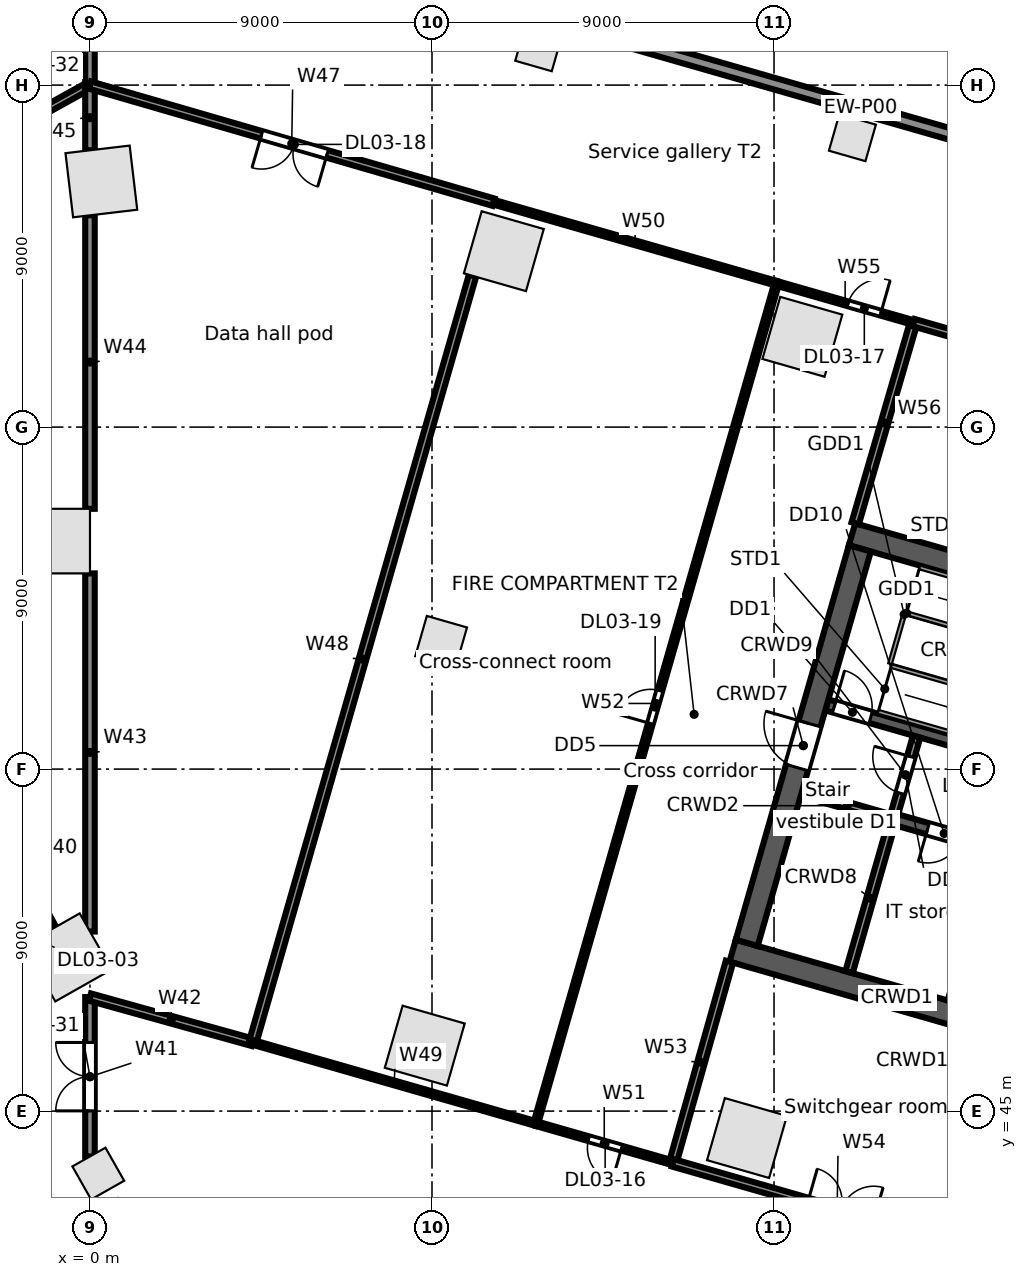
"""IFC4 building model, lengths in metres.
Left out: names, types, materials, properties, quantities, classifications, styles, units other than length and angle.
Written with IfcOpenShell. Run it as: python <this file> out.ifc"""

import sys

from ifc_helpers import new_model, si_unit, direction, frame, frame_2d, origin, origin_2d, place, context, subcontext, project, spatial, rectangle, extrude, element, fill, save


model = new_model("IFC4")
c1 = context("Model", 3, precision=1e-05, world=origin(), true_north=direction((0.0, 1.0)))
c2 = subcontext(c1, "Body", "Model", "MODEL_VIEW")
j1 = project(units=[si_unit("LENGTHUNIT", "METRE"), si_unit("PLANEANGLEUNIT", "RADIAN")], contexts=[c1])
p1 = place(None, origin())
s1 = spatial("IfcSite", under=j1, at=p1, CompositionType="ELEMENT")
p2 = place(p1, origin())
s2 = spatial("IfcBuilding", under=s1, at=p2, CompositionType="ELEMENT")
p3 = place(p2, frame((0.0, 0.0, 16.5)))
s3 = spatial("IfcBuildingStorey", under=s2, at=p3, CompositionType="ELEMENT", Elevation=16.5)
for number, where, z_axis, x_axis in (
    (1, (18.746, 65.376, 0.0), (0.0, 0.0, 1.0), (-0.961, 0.276, 0.0)),
    (2, (10.89, 67.629, 0.0), (0.0, 0.0, 1.0), (-0.961, 0.276, 0.0)),
    (3, (0.3, 69.464, 0.0), (0.0, 0.0, 1.0), (-0.993, -0.118, 0.0)),
    (4, (-0.591, 49.044, 0.0), (0.0, 0.0, 1.0), (0.87, 0.492, 0.0)),
    (5, (8.81, 46.722, 0.0), (0.0, 0.0, 1.0), (0.961, -0.276, 0.0)),
    (6, (17.288, 44.291, 0.0), (0.0, 0.0, 1.0), (0.961, -0.276, 0.0)),
    (7, (-0.85, 60.0, 0.0), (0.0, 0.0, 1.0), (0.0, 1.0, 0.0)),
):
    element("IfcColumn", number, at=place(p3, frame(where, z_axis=z_axis, x_axis=x_axis)), inside=s3, PredefinedType="COLUMN", context=c2, shape_type="SweptSolid", body=[
        extrude(rectangle(XDim=1.7, YDim=1.7, at=origin_2d()), origin(), (0.0, 0.0, 1.0), 5.0),
    ])
for number, where, z_axis, x_axis in (
    (8, (20.062, 70.616, 0.0), (0.0, 0.0, 1.0), (-0.961, 0.276, 0.0)),
    (9, (11.809, 72.983, 0.0), (0.0, 0.0, 1.0), (-0.961, 0.276, 0.0)),
    (10, (0.219, 43.355, 0.0), (0.0, 0.0, 1.0), (0.87, 0.492, 0.0)),
):
    element("IfcColumn", number, at=place(p3, frame(where, z_axis=z_axis, x_axis=x_axis)), inside=s3, PredefinedType="COLUMN", context=c2, shape_type="SweptSolid", body=[
        extrude(rectangle(XDim=1.0, YDim=1.0, at=origin_2d()), origin(), (0.0, 0.0, 1.0), 5.0),
    ])
p4 = place(p3, frame((9.241, 57.35, 0.0), z_axis=(0.0, 0.0, 1.0), x_axis=(0.961261695938, -0.275637355817, 0.0)))
e11 = element("IfcColumn", 11, at=p4, inside=s3, PredefinedType="COLUMN", context=c2, shape_type="SweptSolid", body=[
    extrude(rectangle(XDim=1.1, YDim=1.1, at=origin_2d()), origin(), (0.0, 0.0, 1.0), 5.0),
])
p5 = place(p3, frame((3.747, 76.127, 0.0), z_axis=(0.0, 0.0, 1.0), x_axis=(0.961261546185, -0.275637878067, 0.0)))
e12 = element("IfcWall", 12, at=p5, inside=s3, PredefinedType="STANDARD", context=c2, shape_type="SweptSolid", body=[
    extrude(rectangle(XDim=34.395, YDim=0.3, at=frame_2d((17.197, 0.0))), origin(), (0.0, 0.0, 1.0), 4.65),
])
p6 = place(p3, frame((16.911, 49.221, 0.0), z_axis=(0.0, 0.0, 1.0), x_axis=(0.96126248289, -0.275634611374, 0.0)))
e13 = element("IfcWall", 13, at=p6, inside=s3, PredefinedType="SOLIDWALL", context=c2, shape_type="SweptSolid", body=[
    extrude(rectangle(XDim=9.0, YDim=0.6, at=frame_2d((4.5, 0.0))), origin(), (0.0, 0.0, 1.0), 4.65),
])
p7 = place(p3, frame((18.728, 53.382, 0.0), z_axis=(0.0, 0.0, 1.0), x_axis=(0.961247070632, -0.275688355216, 0.0)))
e14 = element("IfcWall", 14, at=p7, inside=s3, PredefinedType="SOLIDWALL", context=c2, shape_type="SweptSolid", body=[
    extrude(rectangle(XDim=2.5, YDim=0.2, at=frame_2d((1.25, 0.0))), origin(), (0.0, 0.0, 1.0), 4.65),
])
p8 = place(p3, frame((21.131, 52.692, 0.0), z_axis=(0.0, 0.0, 1.0), x_axis=(0.961271492568, -0.275603188616, 0.0)))
e15 = element("IfcWall", 15, at=p8, inside=s3, PredefinedType="SOLIDWALL", context=c2, shape_type="SweptSolid", body=[
    extrude(rectangle(XDim=5.3, YDim=0.3, at=frame_2d((2.65, 0.0))), origin(), (0.0, 0.0, 1.0), 4.65),
])
p9 = place(p8, frame((0.95, 0.0, 0.0)))
e16 = element("IfcOpeningElement", 16, at=p9, cuts=e15, PredefinedType="OPENING", context=c2, shape_type="SweptSolid", body=[
    extrude(rectangle(XDim=0.9, YDim=2.1, at=frame_2d((0.45, 1.05))), frame((0.0, 0.16, 0.0), z_axis=(0.0, -1.0, 0.0), x_axis=(1.0, 0.0, 0.0)), (0.0, 0.0, 1.0), 0.32),
])
p10 = place(p8, frame((3.75, 0.0, 0.0)))
e17 = element("IfcOpeningElement", 17, at=p10, cuts=e15, PredefinedType="OPENING", context=c2, shape_type="SweptSolid", body=[
    extrude(rectangle(XDim=0.9, YDim=2.1, at=frame_2d((0.45, 1.05))), frame((0.0, 0.16, 0.0), z_axis=(0.0, -1.0, 0.0), x_axis=(1.0, 0.0, 0.0)), (0.0, 0.0, 1.0), 0.32),
])
p11 = place(p3, frame((19.389, 55.689, 0.0), z_axis=(0.0, 0.0, 1.0), x_axis=(0.961261397636, -0.275638396117, 0.0)))
e18 = element("IfcWall", 18, at=p11, inside=s3, PredefinedType="SOLIDWALL", context=c2, shape_type="SweptSolid", body=[
    extrude(rectangle(XDim=7.1, YDim=0.3, at=frame_2d((3.55, 0.0))), origin(), (0.0, 0.0, 1.0), 4.65),
])
p12 = place(p11, frame((0.2, 0.0, 0.0)))
e19 = element("IfcOpeningElement", 19, at=p12, cuts=e18, PredefinedType="OPENING", context=c2, shape_type="SweptSolid", body=[
    extrude(rectangle(XDim=1.0, YDim=2.1, at=frame_2d((0.5, 1.05))), frame((0.0, 0.16, 0.0), z_axis=(0.0, -1.0, 0.0), x_axis=(1.0, 0.0, 0.0)), (0.0, 0.0, 1.0), 0.32),
])
p13 = place(p3, frame((20.053, 60.18, 0.0), z_axis=(0.0, 0.0, 1.0), x_axis=(0.96126248289, -0.275634611374, 0.0)))
e20 = element("IfcWall", 20, at=p13, inside=s3, PredefinedType="SOLIDWALL", context=c2, shape_type="SweptSolid", body=[
    extrude(rectangle(XDim=9.0, YDim=0.6, at=frame_2d((4.5, 0.0))), origin(), (0.0, 0.0, 1.0), 4.65),
])
p14 = place(p3, frame((17.282, 49.427, 0.0), z_axis=(0.0, 0.0, 1.0), x_axis=(0.275631631629, 0.961263337304, 0.0)))
e21 = element("IfcWall", 21, at=p14, inside=s3, PredefinedType="SOLIDWALL", context=c2, shape_type="SweptSolid", body=[
    extrude(rectangle(XDim=10.8, YDim=0.6, at=frame_2d((5.4, 0.0))), origin(), (0.0, 0.0, 1.0), 4.65),
])
p15 = place(p14, frame((4.8, 0.0, 0.0)))
e22 = element("IfcOpeningElement", 22, at=p15, cuts=e21, PredefinedType="OPENING", context=c2, shape_type="SweptSolid", body=[
    extrude(rectangle(XDim=1.2, YDim=2.1, at=frame_2d((0.6, 1.05))), frame((0.0, 0.31, 0.0), z_axis=(0.0, -1.0, 0.0), x_axis=(1.0, 0.0, 0.0)), (0.0, 0.0, 1.0), 0.62),
])
p16 = place(p3, frame((19.973, 48.655, 0.0), z_axis=(0.0, 0.0, 1.0), x_axis=(0.275668441653, 0.961252781674, 0.0)))
e23 = element("IfcWall", 23, at=p16, inside=s3, PredefinedType="SOLIDWALL", context=c2, shape_type="SweptSolid", body=[
    extrude(rectangle(XDim=4.05, YDim=0.2, at=frame_2d((2.025, 0.0))), origin(), (0.0, 0.0, 1.0), 4.65),
])
p17 = place(p3, frame((21.172, 52.837, 0.0), z_axis=(0.0, 0.0, 1.0), x_axis=(0.275657676022, 0.961255868981, 0.0)))
e24 = element("IfcWall", 24, at=p17, inside=s3, PredefinedType="PARTITIONING", context=c2, shape_type="SweptSolid", body=[
    extrude(rectangle(XDim=2.1, YDim=0.2, at=frame_2d((1.05, 0.0))), origin(), (0.0, 0.0, 1.0), 4.65),
])
p18 = place(p17, frame((0.55, 0.0, 0.0)))
e25 = element("IfcOpeningElement", 25, at=p18, cuts=e24, PredefinedType="OPENING", context=c2, shape_type="SweptSolid", body=[
    extrude(rectangle(XDim=1.0, YDim=2.1, at=frame_2d((0.5, 1.05))), frame((0.0, 0.11, 0.0), z_axis=(0.0, -1.0, 0.0), x_axis=(1.0, 0.0, 0.0)), (0.0, 0.0, 1.0), 0.22),
])
p19 = place(p3, frame((-6.337, 68.478, 0.0), z_axis=(0.0, 0.0, 1.0), x_axis=(0.87407148623, 0.485797320864, 0.0)))
e26 = element("IfcWall", 26, at=p19, inside=s3, PredefinedType="PARTITIONING", context=c2, shape_type="SweptSolid", body=[
    extrude(rectangle(XDim=7.25, YDim=0.2, at=frame_2d((3.625, 0.0))), origin(), (0.0, 0.0, 1.0), 3.93),
])
p20 = place(p19, frame((2.7, 0.0, 0.0)))
e27 = element("IfcOpeningElement", 27, at=p20, cuts=e26, PredefinedType="OPENING", context=c2, shape_type="SweptSolid", body=[
    extrude(rectangle(XDim=1.8, YDim=2.1, at=frame_2d((0.9, 1.05))), frame((0.0, 0.11, 0.0), z_axis=(0.0, -1.0, 0.0), x_axis=(1.0, 0.0, 0.0)), (0.0, 0.0, 1.0), 0.22),
])
p21 = place(p3, frame((-1.883, 51.467, 0.0), z_axis=(0.0, 0.0, 1.0), x_axis=(0.477162952876, -0.878814836244, 0.0)))
e28 = element("IfcWall", 28, at=p21, inside=s3, PredefinedType="PARTITIONING", context=c2, shape_type="SweptSolid", body=[
    extrude(rectangle(XDim=1.895, YDim=0.2, at=frame_2d((0.947, 0.0))), origin(), (0.0, 0.0, 1.0), 4.65),
])
p22 = place(p3, frame((0.0, 43.806, 0.0), z_axis=(0.0, 0.0, 1.0), x_axis=(0.0, 1.0, 0.0)))
e29 = element("IfcWall", 29, at=p22, inside=s3, PredefinedType="PARTITIONING", context=c2, shape_type="SweptSolid", body=[
    extrude(rectangle(XDim=4.194, YDim=0.25, at=frame_2d((2.097, 0.0))), origin(), (0.0, 0.0, 1.0), 3.712),
])
p23 = place(p22, frame((1.2, 0.0, 0.0)))
e30 = element("IfcOpeningElement", 30, at=p23, cuts=e29, PredefinedType="OPENING", context=c2, shape_type="SweptSolid", body=[
    extrude(rectangle(XDim=1.8, YDim=2.1, at=frame_2d((0.9, 1.05))), frame((0.0, 0.135, 0.0), z_axis=(0.0, -1.0, 0.0), x_axis=(1.0, 0.0, 0.0)), (0.0, 0.0, 1.0), 0.27),
])
p24 = place(p3, frame((0.0, 48.0, 0.0), z_axis=(0.0, 0.0, 1.0), x_axis=(0.963400508162, -0.268066150181, 0.0)))
e31 = element("IfcWall", 31, at=p24, inside=s3, PredefinedType="PARTITIONING", context=c2, shape_type="SweptSolid", body=[
    extrude(rectangle(XDim=4.443, YDim=0.2, at=frame_2d((2.221, 0.0))), origin(), (0.0, 0.0, 1.0), 4.65),
])
p25 = place(p3, frame((0.0, 49.726, 0.0), z_axis=(0.0, 0.0, 1.0), x_axis=(0.0, 1.0, 0.0)))
e32 = element("IfcWall", 32, at=p25, inside=s3, PredefinedType="PARTITIONING", context=c2, shape_type="SweptSolid", body=[
    extrude(rectangle(XDim=9.424, YDim=0.25, at=frame_2d((4.712, 0.0))), origin(), (0.0, 0.0, 1.0), 4.65),
])
p26 = place(p3, frame((0.0, 60.85, 0.0), z_axis=(0.0, 0.0, 1.0), x_axis=(0.0, 1.0, 0.0)))
e33 = element("IfcWall", 33, at=p26, inside=s3, PredefinedType="PARTITIONING", context=c2, shape_type="SweptSolid", body=[
    extrude(rectangle(XDim=7.723, YDim=0.25, at=frame_2d((3.861, 0.0))), origin(), (0.0, 0.0, 1.0), 3.93),
])
p27 = place(p3, frame((0.0, 70.285, 0.0), z_axis=(0.0, 0.0, 1.0), x_axis=(0.0, 1.0, 0.0)))
e34 = element("IfcWall", 34, at=p27, inside=s3, PredefinedType="PARTITIONING", context=c2, shape_type="SweptSolid", body=[
    extrude(rectangle(XDim=1.715, YDim=0.25, at=frame_2d((0.857, 0.0))), origin(), (0.0, 0.0, 1.0), 4.65),
])
p28 = place(p3, frame((0.0, 72.0, 0.0), z_axis=(0.0, 0.0, 1.0), x_axis=(0.0, 1.0, 0.0)))
e35 = element("IfcWall", 35, at=p28, inside=s3, PredefinedType="PARTITIONING", context=c2, shape_type="SweptSolid", body=[
    extrude(rectangle(XDim=3.521, YDim=0.25, at=frame_2d((1.76, 0.0))), origin(), (0.0, 0.0, 1.0), 4.024),
])
p29 = place(p28, frame((0.95, 0.0, 0.0)))
e36 = element("IfcOpeningElement", 36, at=p29, cuts=e35, PredefinedType="OPENING", context=c2, shape_type="SweptSolid", body=[
    extrude(rectangle(XDim=1.8, YDim=2.1, at=frame_2d((0.9, 1.05))), frame((0.0, 0.135, 0.0), z_axis=(0.0, -1.0, 0.0), x_axis=(1.0, 0.0, 0.0)), (0.0, 0.0, 1.0), 0.27),
])
p30 = place(p3, frame((0.0, 72.0, 0.0), z_axis=(0.0, 0.0, 1.0), x_axis=(0.960375968852, -0.278707729443, 0.0)))
e37 = element("IfcWall", 37, at=p30, inside=s3, PredefinedType="PARTITIONING", context=c2, shape_type="SweptSolid", body=[
    extrude(rectangle(XDim=11.058, YDim=0.2, at=frame_2d((5.529, 0.0))), origin(), (0.0, 0.0, 1.0), 3.712),
])
p31 = place(p30, frame((4.7, 0.0, 0.0)))
e38 = element("IfcOpeningElement", 38, at=p31, cuts=e37, PredefinedType="OPENING", context=c2, shape_type="SweptSolid", body=[
    extrude(rectangle(XDim=1.8, YDim=2.1, at=frame_2d((0.9, 1.05))), frame((0.0, 0.11, 0.0), z_axis=(0.0, -1.0, 0.0), x_axis=(1.0, 0.0, 0.0)), (0.0, 0.0, 1.0), 0.22),
])
p32 = place(p3, frame((4.28, 46.809, 0.0), z_axis=(0.0, 0.0, 1.0), x_axis=(0.27566906052, 0.961252604195, 0.0)))
e39 = element("IfcWall", 39, at=p32, inside=s3, PredefinedType="PARTITIONING", context=c2, shape_type="SweptSolid", body=[
    extrude(rectangle(XDim=20.985, YDim=0.2, at=frame_2d((10.493, 0.0))), origin(), (0.0, 0.0, 1.0), 3.712),
])
p33 = place(p3, frame((4.28, 46.809, 0.0), z_axis=(0.0, 0.0, 1.0), x_axis=(0.961270337968, -0.275607215693, 0.0)))
e40 = element("IfcWall", 40, at=p33, inside=s3, PredefinedType="PARTITIONING", context=c2, shape_type="SweptSolid", body=[
    extrude(rectangle(XDim=7.75, YDim=0.125, at=frame_2d((3.875, 0.0))), origin(), (0.0, 0.0, 1.0), 4.03),
])
p34 = place(p3, frame((10.62, 68.918, 0.0), z_axis=(0.0, 0.0, 1.0), x_axis=(0.961260764876, -0.275640602796, 0.0)))
e41 = element("IfcWall", 41, at=p34, inside=s3, PredefinedType="PARTITIONING", context=c2, shape_type="SweptSolid", body=[
    extrude(rectangle(XDim=7.749, YDim=0.125, at=frame_2d((3.875, 0.0))), origin(), (0.0, 0.0, 1.0), 3.712),
])
p35 = place(p3, frame((11.73, 44.673, 0.0), z_axis=(0.0, 0.0, 1.0), x_axis=(0.961228613303, -0.275752702557, 0.0)))
e42 = element("IfcWall", 42, at=p35, inside=s3, PredefinedType="PARTITIONING", context=c2, shape_type="SweptSolid", body=[
    extrude(rectangle(XDim=3.75, YDim=0.125, at=frame_2d((1.875, 0.0))), origin(), (0.0, 0.0, 1.0), 4.65),
])
p36 = place(p35, frame((1.45, 0.0, 0.0)))
e43 = element("IfcOpeningElement", 43, at=p36, cuts=e42, PredefinedType="OPENING", context=c2, shape_type="SweptSolid", body=[
    extrude(rectangle(XDim=0.9, YDim=2.1, at=frame_2d((0.45, 1.05))), frame((0.0, 0.073, 0.0), z_axis=(0.0, -1.0, 0.0), x_axis=(1.0, 0.0, 0.0)), (0.0, 0.0, 1.0), 0.145),
])
p37 = place(p3, frame((11.73, 44.673, 0.0), z_axis=(0.0, 0.0, 1.0), x_axis=(0.275616869382, 0.961267570093, 0.0)))
e44 = element("IfcWall", 44, at=p37, inside=s3, PredefinedType="PARTITIONING", context=c2, shape_type="SweptSolid", body=[
    extrude(rectangle(XDim=23.0, YDim=0.125, at=frame_2d((11.5, 0.0))), origin(), (0.0, 0.0, 1.0), 3.712),
])
p38 = place(p37, frame((10.95, 0.0, 0.0)))
e45 = element("IfcOpeningElement", 45, at=p38, cuts=e44, PredefinedType="OPENING", context=c2, shape_type="SweptSolid", body=[
    extrude(rectangle(XDim=0.9, YDim=2.1, at=frame_2d((0.45, 1.05))), frame((0.0, 0.073, 0.0), z_axis=(0.0, -1.0, 0.0), x_axis=(1.0, 0.0, 0.0)), (0.0, 0.0, 1.0), 0.145),
])
p39 = place(p3, frame((15.335, 43.639, 0.0), z_axis=(0.0, 0.0, 1.0), x_axis=(0.271407455373, 0.962464541252, 0.0)))
e46 = element("IfcWall", 46, at=p39, inside=s3, PredefinedType="PARTITIONING", context=c2, shape_type="SweptSolid", body=[
    extrude(rectangle(XDim=5.501, YDim=0.2, at=frame_2d((2.75, 0.0))), origin(), (0.0, 0.0, 1.0), 3.93),
])
p40 = place(p3, frame((15.335, 43.639, 0.0), z_axis=(0.0, 0.0, 1.0), x_axis=(0.961281982754, -0.275566597455, 0.0)))
e47 = element("IfcWall", 47, at=p40, inside=s3, PredefinedType="PARTITIONING", context=c2, shape_type="SweptSolid", body=[
    extrude(rectangle(XDim=9.0, YDim=0.2, at=frame_2d((4.5, 0.0))), origin(), (0.0, 0.0, 1.0), 3.822),
])
p41 = place(p40, frame((3.7, 0.0, 0.0)))
e48 = element("IfcOpeningElement", 48, at=p41, cuts=e47, PredefinedType="OPENING", context=c2, shape_type="SweptSolid", body=[
    extrude(rectangle(XDim=1.8, YDim=2.1, at=frame_2d((0.9, 1.05))), frame((0.0, 0.11, 0.0), z_axis=(0.0, -1.0, 0.0), x_axis=(1.0, 0.0, 0.0)), (0.0, 0.0, 1.0), 0.22),
])
p42 = place(p3, frame((18.069, 66.782, 0.0), z_axis=(0.0, 0.0, 1.0), x_axis=(0.961314848061, -0.275451924837, 0.0)))
e49 = element("IfcWall", 49, at=p42, inside=s3, PredefinedType="PARTITIONING", context=c2, shape_type="SweptSolid", body=[
    extrude(rectangle(XDim=3.75, YDim=0.125, at=frame_2d((1.875, 0.0))), origin(), (0.0, 0.0, 1.0), 3.712),
])
p43 = place(p42, frame((1.95, 0.0, 0.0)))
e50 = element("IfcOpeningElement", 50, at=p43, cuts=e49, PredefinedType="OPENING", context=c2, shape_type="SweptSolid", body=[
    extrude(rectangle(XDim=0.9, YDim=2.1, at=frame_2d((0.45, 1.05))), frame((0.0, 0.073, 0.0), z_axis=(0.0, -1.0, 0.0), x_axis=(1.0, 0.0, 0.0)), (0.0, 0.0, 1.0), 0.145),
])
p44 = place(p3, frame((20.136, 60.468, 0.0), z_axis=(0.0, 0.0, 1.0), x_axis=(0.279630121779, 0.96010780384, 0.0)))
e51 = element("IfcWall", 51, at=p44, inside=s3, PredefinedType="PARTITIONING", context=c2, shape_type="SweptSolid", body=[
    extrude(rectangle(XDim=5.5, YDim=0.2, at=frame_2d((2.75, 0.0))), origin(), (0.0, 0.0, 1.0), 4.018),
])
p45 = place(p3, frame((21.674, 65.749, 0.0), z_axis=(0.0, 0.0, 1.0), x_axis=(0.961259417468, -0.275645301662, 0.0)))
e52 = element("IfcWall", 52, at=p45, inside=s3, PredefinedType="PARTITIONING", context=c2, shape_type="SweptSolid", body=[
    extrude(rectangle(XDim=9.0, YDim=0.2, at=frame_2d((4.5, 0.0))), origin(), (0.0, 0.0, 1.0), 3.822),
])
p46 = place(p45, frame((2.7, 0.0, 0.0)))
e53 = element("IfcOpeningElement", 53, at=p46, cuts=e52, PredefinedType="OPENING", context=c2, shape_type="SweptSolid", body=[
    extrude(rectangle(XDim=1.8, YDim=2.1, at=frame_2d((0.9, 1.05))), frame((0.0, 0.11, 0.0), z_axis=(0.0, -1.0, 0.0), x_axis=(1.0, 0.0, 0.0)), (0.0, 0.0, 1.0), 0.22),
])
p47 = place(p12, origin())
e54 = element("IfcDoor", 54, at=p47, inside=s3, OperationType="SINGLE_SWING_LEFT", PredefinedType="DOOR", context=c2, shape_type="SweptSolid", body=[
    extrude(rectangle(XDim=1.0, YDim=2.1, at=frame_2d((0.5, 1.05))), frame((0.0, 0.025, 0.0), z_axis=(0.0, -1.0, 0.0), x_axis=(1.0, 0.0, 0.0)), (0.0, 0.0, 1.0), 0.05),
])
fill(e19, e54)
p48 = place(p18, origin())
e55 = element("IfcDoor", 55, at=p48, inside=s3, OperationType="SINGLE_SWING_RIGHT", PredefinedType="DOOR", context=c2, shape_type="SweptSolid", body=[
    extrude(rectangle(XDim=1.0, YDim=2.1, at=frame_2d((0.5, 1.05))), frame((0.0, 0.025, 0.0), z_axis=(0.0, -1.0, 0.0), x_axis=(1.0, 0.0, 0.0)), (0.0, 0.0, 1.0), 0.05),
])
fill(e25, e55)
p49 = place(p15, origin())
e56 = element("IfcDoor", 56, at=p49, inside=s3, OperationType="SINGLE_SWING_RIGHT", PredefinedType="DOOR", context=c2, shape_type="SweptSolid", body=[
    extrude(rectangle(XDim=1.2, YDim=2.1, at=frame_2d((0.6, 1.05))), frame((0.0, 0.025, 0.0), z_axis=(0.0, -1.0, 0.0), x_axis=(1.0, 0.0, 0.0)), (0.0, 0.0, 1.0), 0.05),
])
fill(e22, e56)
p50 = place(p9, frame((0.9, 0.0, 0.0), z_axis=(0.0, 0.0, 1.0), x_axis=(-1.0, 0.0, 0.0)))
e57 = element("IfcDoor", 57, at=p50, inside=s3, OperationType="SINGLE_SWING_RIGHT", PredefinedType="DOOR", context=c2, shape_type="SweptSolid", body=[
    extrude(rectangle(XDim=0.9, YDim=2.1, at=frame_2d((0.45, 1.05))), frame((0.0, 0.025, 0.0), z_axis=(0.0, -1.0, 0.0), x_axis=(1.0, 0.0, 0.0)), (0.0, 0.0, 1.0), 0.05),
])
fill(e16, e57)
p51 = place(p36, frame((0.9, 0.0, 0.0), z_axis=(0.0, 0.0, 1.0), x_axis=(-1.0, 0.0, 0.0)))
e58 = element("IfcDoor", 58, at=p51, inside=s3, OperationType="SINGLE_SWING_LEFT", PredefinedType="DOOR", context=c2, shape_type="SweptSolid", body=[
    extrude(rectangle(XDim=0.9, YDim=2.1, at=frame_2d((0.45, 1.05))), frame((0.0, 0.025, 0.0), z_axis=(0.0, -1.0, 0.0), x_axis=(1.0, 0.0, 0.0)), (0.0, 0.0, 1.0), 0.05),
])
fill(e43, e58)
p52 = place(p43, origin())
e59 = element("IfcDoor", 59, at=p52, inside=s3, OperationType="SINGLE_SWING_RIGHT", PredefinedType="DOOR", context=c2, shape_type="SweptSolid", body=[
    extrude(rectangle(XDim=0.9, YDim=2.1, at=frame_2d((0.45, 1.05))), frame((0.0, 0.025, 0.0), z_axis=(0.0, -1.0, 0.0), x_axis=(1.0, 0.0, 0.0)), (0.0, 0.0, 1.0), 0.05),
])
fill(e50, e59)
p53 = place(p31, frame((1.8, 0.0, 0.0), z_axis=(0.0, 0.0, 1.0), x_axis=(-1.0, 0.0, 0.0)))
e60 = element("IfcDoor", 60, at=p53, inside=s3, OperationType="DOUBLE_DOOR_SINGLE_SWING", PredefinedType="DOOR", context=c2, shape_type="SweptSolid", body=[
    extrude(rectangle(XDim=1.8, YDim=2.1, at=frame_2d((0.9, 1.05))), frame((0.0, 0.025, 0.0), z_axis=(0.0, -1.0, 0.0), x_axis=(1.0, 0.0, 0.0)), (0.0, 0.0, 1.0), 0.05),
])
fill(e38, e60)
p54 = place(p38, origin())
e61 = element("IfcDoor", 61, at=p54, inside=s3, OperationType="SINGLE_SWING_LEFT", PredefinedType="DOOR", context=c2, shape_type="SweptSolid", body=[
    extrude(rectangle(XDim=0.9, YDim=2.1, at=frame_2d((0.45, 1.05))), frame((0.0, 0.025, 0.0), z_axis=(0.0, -1.0, 0.0), x_axis=(1.0, 0.0, 0.0)), (0.0, 0.0, 1.0), 0.05),
])
fill(e45, e61)
p55 = place(p23, origin())
e62 = element("IfcDoor", 62, at=p55, inside=s3, OperationType="DOUBLE_DOOR_SINGLE_SWING", PredefinedType="DOOR", context=c2, shape_type="SweptSolid", body=[
    extrude(rectangle(XDim=1.8, YDim=2.1, at=frame_2d((0.9, 1.05))), frame((0.0, 0.025, 0.0), z_axis=(0.0, -1.0, 0.0), x_axis=(1.0, 0.0, 0.0)), (0.0, 0.0, 1.0), 0.05),
])
fill(e30, e62)
save(model, sys.argv[1])
